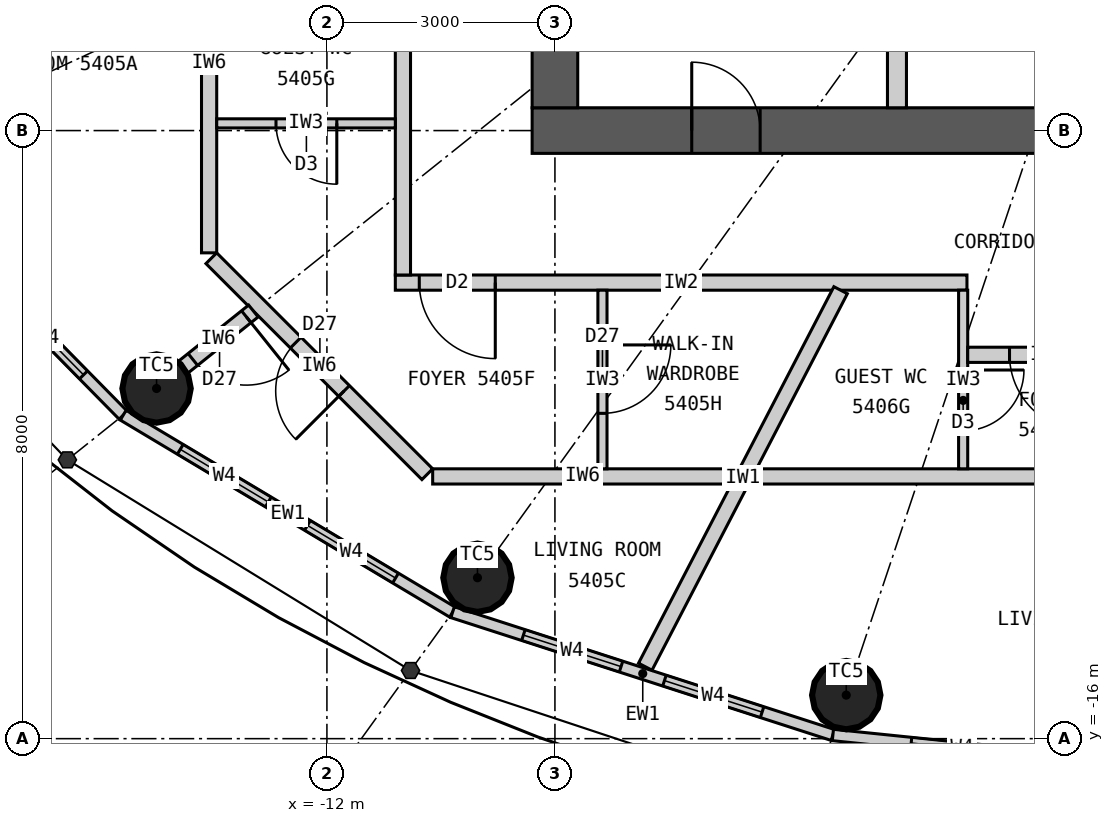
"""IFC4 building model, lengths in metres.
Left out: names, types, materials, properties, quantities, classifications, styles, units other than length and angle.
Written with IfcOpenShell. Run it as: python <this file> out.ifc"""

import sys

from ifc_helpers import new_model, si_unit, direction, frame, frame_2d, origin, origin_2d, place, context, subcontext, project, spatial, rectangle, circle, extrude, element, fill, save


model = new_model("IFC4")
c1 = context("Model", 3, precision=1e-05, world=origin(), true_north=direction((0.0, 1.0)))
c2 = subcontext(c1, "Body", "Model", "MODEL_VIEW")
j1 = project(units=[si_unit("LENGTHUNIT", "METRE"), si_unit("PLANEANGLEUNIT", "RADIAN")], contexts=[c1])
p1 = place(None, origin())
s1 = spatial("IfcSite", under=j1, at=p1, CompositionType="ELEMENT")
p2 = place(p1, origin())
s2 = spatial("IfcBuilding", under=s1, at=p2, CompositionType="ELEMENT")
p3 = place(p2, frame((0.0, 0.0, 202.8)))
s3 = spatial("IfcBuildingStorey", under=s2, at=p3, CompositionType="ELEMENT", Elevation=202.8)
for number, where, z_axis, x_axis in (
    (1, (-14.241, -11.393, 0.0), (0.0, 0.0, 1.0), (1.0, 0.0, 0.0)),
    (2, (-10.019, -13.883, 0.0), (0.0, 0.0, 1.0), (1.0, 0.0, 0.0)),
    (3, (-5.167, -15.427, 0.0), (0.0, 0.0, 1.0), (1.0, 0.0, 0.0)),
):
    element("IfcColumn", number, at=place(p3, frame(where, z_axis=z_axis, x_axis=x_axis)), inside=s3, PredefinedType="COLUMN", context=c2, shape_type="SweptSolid", body=[
        extrude(circle(Radius=0.45, at=origin_2d()), origin(), (0.0, 0.0, 1.0), 3.3),
    ])
p4 = place(p3, frame((9.3, -8.0, 0.0), z_axis=(0.0, 0.0, 1.0), x_axis=(-1.0, 0.0, 0.0)))
e4 = element("IfcWall", 4, at=p4, inside=s3, PredefinedType="SHEAR", context=c2, shape_type="SweptSolid", body=[
    extrude(rectangle(XDim=18.6, YDim=0.6, at=frame_2d((9.3, 0.0))), origin(), (0.0, 0.0, 1.0), 3.3),
])
p5 = place(p4, frame((8.0, 0.0, 0.0)))
e5 = element("IfcOpeningElement", 5, at=p5, cuts=e4, PredefinedType="OPENING", context=c2, shape_type="SweptSolid", body=[
    extrude(rectangle(XDim=1.2, YDim=2.2, at=frame_2d((0.6, 1.1))), frame((0.0, 0.31, 0.0), z_axis=(0.0, -1.0, 0.0), x_axis=(1.0, 0.0, 0.0)), (0.0, 0.0, 1.0), 0.62),
])
p6 = place(p4, frame((15.6, 0.0, 0.0)))
e6 = element("IfcOpeningElement", 6, at=p6, cuts=e4, PredefinedType="OPENING", context=c2, shape_type="SweptSolid", body=[
    extrude(rectangle(XDim=0.9, YDim=2.2, at=frame_2d((0.45, 1.1))), frame((0.0, 0.31, 0.0), z_axis=(0.0, -1.0, 0.0), x_axis=(1.0, 0.0, 0.0)), (0.0, 0.0, 1.0), 0.62),
])
p7 = place(p3, frame((-9.0, 7.7, 0.0), z_axis=(0.0, 0.0, 1.0), x_axis=(0.0, -1.0, 0.0)))
e7 = element("IfcWall", 7, at=p7, inside=s3, PredefinedType="SHEAR", context=c2, shape_type="SweptSolid", body=[
    extrude(rectangle(XDim=15.4, YDim=0.6, at=frame_2d((7.7, 0.0))), origin(), (0.0, 0.0, 1.0), 3.3),
])
p8 = place(p7, frame((6.8, 0.0, 0.0)))
e8 = element("IfcOpeningElement", 8, at=p8, cuts=e7, PredefinedType="OPENING", context=c2, shape_type="SweptSolid", body=[
    extrude(rectangle(XDim=1.8, YDim=2.2, at=frame_2d((0.9, 1.1))), frame((0.0, 0.31, 0.0), z_axis=(0.0, -1.0, 0.0), x_axis=(1.0, 0.0, 0.0)), (0.0, 0.0, 1.0), 0.62),
])
p9 = place(p3, frame((-4.5, -7.7, 0.0), z_axis=(0.0, 0.0, 1.0), x_axis=(0.0, 1.0, 0.0)))
e9 = element("IfcWall", 9, at=p9, inside=s3, PredefinedType="PARTITIONING", context=c2, shape_type="SweptSolid", body=[
    extrude(rectangle(XDim=3.2, YDim=0.25, at=frame_2d((1.6, 0.0))), origin(), (0.0, 0.0, 1.0), 3.3),
])
p10 = place(p3, frame((-18.04, -8.332, 0.0), z_axis=(0.0, 0.0, 1.0), x_axis=(0.701527379618, -0.712642501993, 0.0)))
e10 = element("IfcWall", 10, at=p10, inside=s3, PredefinedType="ELEMENTEDWALL", context=c2, shape_type="SweptSolid", body=[
    extrude(rectangle(XDim=4.788, YDim=0.15, at=frame_2d((2.394, 0.0))), origin(), (0.0, 0.0, 1.0), 3.12),
])
p11 = place(p10, frame((0.744, 0.0, 0.9)))
e11 = element("IfcOpeningElement", 11, at=p11, cuts=e10, PredefinedType="OPENING", context=c2, shape_type="SweptSolid", body=[
    extrude(rectangle(XDim=1.35, YDim=1.9, at=frame_2d((0.675, 0.95))), frame((0.0, 0.085, 0.0), z_axis=(0.0, -1.0, 0.0), x_axis=(1.0, 0.0, 0.0)), (0.0, 0.0, 1.0), 0.17),
])
p12 = place(p10, frame((2.694, 0.0, 0.9)))
e12 = element("IfcOpeningElement", 12, at=p12, cuts=e10, PredefinedType="OPENING", context=c2, shape_type="SweptSolid", body=[
    extrude(rectangle(XDim=1.35, YDim=1.9, at=frame_2d((0.675, 0.95))), frame((0.0, 0.085, 0.0), z_axis=(0.0, -1.0, 0.0), x_axis=(1.0, 0.0, 0.0)), (0.0, 0.0, 1.0), 0.17),
])
p13 = place(p3, frame((-14.68, -11.744, 0.0), z_axis=(0.0, 0.0, 1.0), x_axis=(0.85822150553, -0.513279502265, 0.0)))
e13 = element("IfcWall", 13, at=p13, inside=s3, PredefinedType="ELEMENTEDWALL", context=c2, shape_type="SweptSolid", body=[
    extrude(rectangle(XDim=5.05, YDim=0.15, at=frame_2d((2.525, 0.0))), origin(), (0.0, 0.0, 1.0), 3.12),
])
p14 = place(p13, frame((0.875, 0.0, 0.9)))
e14 = element("IfcOpeningElement", 14, at=p14, cuts=e13, PredefinedType="OPENING", context=c2, shape_type="SweptSolid", body=[
    extrude(rectangle(XDim=1.35, YDim=1.9, at=frame_2d((0.675, 0.95))), frame((0.0, 0.085, 0.0), z_axis=(0.0, -1.0, 0.0), x_axis=(1.0, 0.0, 0.0)), (0.0, 0.0, 1.0), 0.17),
])
p15 = place(p13, frame((2.825, 0.0, 0.9)))
e15 = element("IfcOpeningElement", 15, at=p15, cuts=e13, PredefinedType="OPENING", context=c2, shape_type="SweptSolid", body=[
    extrude(rectangle(XDim=1.35, YDim=1.9, at=frame_2d((0.675, 0.95))), frame((0.0, 0.085, 0.0), z_axis=(0.0, -1.0, 0.0), x_axis=(1.0, 0.0, 0.0)), (0.0, 0.0, 1.0), 0.17),
])
p16 = place(p3, frame((-10.346, -14.336, 0.0), z_axis=(0.0, 0.0, 1.0), x_axis=(0.951644702515, -0.307200846638, 0.0)))
e16 = element("IfcWall", 16, at=p16, inside=s3, PredefinedType="ELEMENTEDWALL", context=c2, shape_type="SweptSolid", body=[
    extrude(rectangle(XDim=5.258, YDim=0.15, at=frame_2d((2.629, 0.0))), origin(), (0.0, 0.0, 1.0), 3.12),
])
p17 = place(p16, frame((0.979, 0.0, 0.9)))
e17 = element("IfcOpeningElement", 17, at=p17, cuts=e16, PredefinedType="OPENING", context=c2, shape_type="SweptSolid", body=[
    extrude(rectangle(XDim=1.35, YDim=1.9, at=frame_2d((0.675, 0.95))), frame((0.0, 0.085, 0.0), z_axis=(0.0, -1.0, 0.0), x_axis=(1.0, 0.0, 0.0)), (0.0, 0.0, 1.0), 0.17),
])
p18 = place(p16, frame((2.929, 0.0, 0.9)))
e18 = element("IfcOpeningElement", 18, at=p18, cuts=e16, PredefinedType="OPENING", context=c2, shape_type="SweptSolid", body=[
    extrude(rectangle(XDim=1.35, YDim=1.9, at=frame_2d((0.675, 0.95))), frame((0.0, 0.085, 0.0), z_axis=(0.0, -1.0, 0.0), x_axis=(1.0, 0.0, 0.0)), (0.0, 0.0, 1.0), 0.17),
])
p19 = place(p3, frame((-5.343, -15.952, 0.0), z_axis=(0.0, 0.0, 1.0), x_axis=(0.994774574972, -0.102095763818, 0.0)))
e19 = element("IfcWall", 19, at=p19, inside=s3, PredefinedType="ELEMENTEDWALL", context=c2, shape_type="SweptSolid", body=[
    extrude(rectangle(XDim=5.371, YDim=0.15, at=frame_2d((2.686, 0.0))), origin(), (0.0, 0.0, 1.0), 3.12),
])
p20 = place(p19, frame((1.035, 0.0, 0.9)))
e20 = element("IfcOpeningElement", 20, at=p20, cuts=e19, PredefinedType="OPENING", context=c2, shape_type="SweptSolid", body=[
    extrude(rectangle(XDim=1.35, YDim=1.9, at=frame_2d((0.675, 0.95))), frame((0.0, 0.085, 0.0), z_axis=(0.0, -1.0, 0.0), x_axis=(1.0, 0.0, 0.0)), (0.0, 0.0, 1.0), 0.17),
])
p21 = place(p19, frame((2.985, 0.0, 0.9)))
e21 = element("IfcOpeningElement", 21, at=p21, cuts=e19, PredefinedType="OPENING", context=c2, shape_type="SweptSolid", body=[
    extrude(rectangle(XDim=1.35, YDim=1.9, at=frame_2d((0.675, 0.95))), frame((0.0, 0.085, 0.0), z_axis=(0.0, -1.0, 0.0), x_axis=(1.0, 0.0, 0.0)), (0.0, 0.0, 1.0), 0.17),
])
p22 = place(p3, frame((-3.579, -10.0, 0.0), z_axis=(0.0, 0.0, 1.0), x_axis=(-1.0, 0.0, 0.0)))
e22 = element("IfcWall", 22, at=p22, inside=s3, PredefinedType="PARTITIONING", context=c2, shape_type="SweptSolid", body=[
    extrude(rectangle(XDim=7.521, YDim=0.2, at=frame_2d((3.761, 0.0))), origin(), (0.0, 0.0, 1.0), 3.12),
])
p23 = place(p22, frame((6.206, 0.0, 0.0)))
e23 = element("IfcOpeningElement", 23, at=p23, cuts=e22, PredefinedType="OPENING", context=c2, shape_type="SweptSolid", body=[
    extrude(rectangle(XDim=1.0, YDim=2.2, at=frame_2d((0.5, 1.1))), frame((0.0, 0.11, 0.0), z_axis=(0.0, -1.0, 0.0), x_axis=(1.0, 0.0, 0.0)), (0.0, 0.0, 1.0), 0.22),
])
p24 = place(p3, frame((-11.0, 0.464, 0.0), z_axis=(0.0, 0.0, 1.0), x_axis=(0.0, -1.0, 0.0)))
e24 = element("IfcWall", 24, at=p24, inside=s3, PredefinedType="PARTITIONING", context=c2, shape_type="SweptSolid", body=[
    extrude(rectangle(XDim=10.364, YDim=0.2, at=frame_2d((5.182, 0.0))), origin(), (0.0, 0.0, 1.0), 3.12),
])
p25 = place(p3, frame((-5.241, -10.1, 0.0), z_axis=(0.0, 0.0, 1.0), x_axis=(-0.460603196597, -0.887606160008, 0.0)))
e25 = element("IfcWall", 25, at=p25, inside=s3, PredefinedType="PARTITIONING", context=c2, shape_type="SweptSolid", body=[
    extrude(rectangle(XDim=5.58, YDim=0.2, at=frame_2d((2.79, 0.0))), origin(), (0.0, 0.0, 1.0), 3.12),
])
p26 = place(p3, frame((-13.55, -4.6, 0.0), z_axis=(0.0, 0.0, 1.0), x_axis=(0.0, -1.0, 0.0)))
e26 = element("IfcWall", 26, at=p26, inside=s3, PredefinedType="PARTITIONING", context=c2, shape_type="SweptSolid", body=[
    extrude(rectangle(XDim=5.009, YDim=0.2, at=frame_2d((2.504, 0.0))), origin(), (0.0, 0.0, 1.0), 3.12),
])
p27 = place(p26, frame((0.774, 0.0, 0.0)))
e27 = element("IfcOpeningElement", 27, at=p27, cuts=e26, PredefinedType="OPENING", context=c2, shape_type="SweptSolid", body=[
    extrude(rectangle(XDim=0.8, YDim=2.1, at=frame_2d((0.4, 1.05))), frame((0.0, 0.11, 0.0), z_axis=(0.0, -1.0, 0.0), x_axis=(1.0, 0.0, 0.0)), (0.0, 0.0, 1.0), 0.22),
])
p28 = place(p3, frame((-13.521, -9.679, 0.0), z_axis=(0.0, 0.0, 1.0), x_axis=(0.707106781187, -0.707106781187, 0.0)))
e28 = element("IfcWall", 28, at=p28, inside=s3, PredefinedType="PARTITIONING", context=c2, shape_type="SweptSolid", body=[
    extrude(rectangle(XDim=4.019, YDim=0.2, at=frame_2d((2.009, 0.0))), origin(), (0.0, 0.0, 1.0), 3.12),
])
p29 = place(p28, frame((1.57, 0.0, 0.0)))
e29 = element("IfcOpeningElement", 29, at=p29, cuts=e28, PredefinedType="OPENING", context=c2, shape_type="SweptSolid", body=[
    extrude(rectangle(XDim=0.9, YDim=2.1, at=frame_2d((0.45, 1.05))), frame((0.0, 0.11, 0.0), z_axis=(0.0, -1.0, 0.0), x_axis=(1.0, 0.0, 0.0)), (0.0, 0.0, 1.0), 0.22),
])
p30 = place(p3, frame((-10.609, -12.55, 0.0), z_axis=(0.0, 0.0, 1.0), x_axis=(1.0, 0.0, 0.0)))
e30 = element("IfcWall", 30, at=p30, inside=s3, PredefinedType="PARTITIONING", context=c2, shape_type="SweptSolid", body=[
    extrude(rectangle(XDim=3.947, YDim=0.2, at=frame_2d((1.974, 0.0))), origin(), (0.0, 0.0, 1.0), 3.12),
])
p31 = place(p3, frame((-12.968, -10.374, 0.0), z_axis=(0.0, 0.0, 1.0), x_axis=(-0.780888968944, -0.624669847345, 0.0)))
e31 = element("IfcWall", 31, at=p31, inside=s3, PredefinedType="PARTITIONING", context=c2, shape_type="SweptSolid", body=[
    extrude(rectangle(XDim=1.181, YDim=0.2, at=frame_2d((0.591, 0.0))), origin(), (0.0, 0.0, 1.0), 2.42),
])
p32 = place(p31, frame((0.12, 0.0, 0.0)))
e32 = element("IfcOpeningElement", 32, at=p32, cuts=e31, PredefinedType="OPENING", context=c2, shape_type="SweptSolid", body=[
    extrude(rectangle(XDim=0.9, YDim=2.1, at=frame_2d((0.45, 1.05))), frame((0.0, 0.11, 0.0), z_axis=(0.0, -1.0, 0.0), x_axis=(1.0, 0.0, 0.0)), (0.0, 0.0, 1.0), 0.22),
])
p33 = place(p3, frame((-11.1, -7.905, 0.0), z_axis=(0.0, 0.0, 1.0), x_axis=(-1.0, 0.0, 0.0)))
e33 = element("IfcWall", 33, at=p33, inside=s3, PredefinedType="PARTITIONING", context=c2, shape_type="SweptSolid", body=[
    extrude(rectangle(XDim=2.35, YDim=0.12, at=frame_2d((1.175, 0.0))), origin(), (0.0, 0.0, 1.0), 3.12),
])
p34 = place(p33, frame((0.77, 0.0, 0.0)))
e34 = element("IfcOpeningElement", 34, at=p34, cuts=e33, PredefinedType="OPENING", context=c2, shape_type="SweptSolid", body=[
    extrude(rectangle(XDim=0.8, YDim=2.1, at=frame_2d((0.4, 1.05))), frame((0.0, 0.07, 0.0), z_axis=(0.0, -1.0, 0.0), x_axis=(1.0, 0.0, 0.0)), (0.0, 0.0, 1.0), 0.14),
])
p35 = place(p3, frame((-8.375, -10.1, 0.0), z_axis=(0.0, 0.0, 1.0), x_axis=(0.0, -1.0, 0.0)))
e35 = element("IfcWall", 35, at=p35, inside=s3, PredefinedType="PARTITIONING", context=c2, shape_type="SweptSolid", body=[
    extrude(rectangle(XDim=2.35, YDim=0.12, at=frame_2d((1.175, 0.0))), origin(), (0.0, 0.0, 1.0), 3.12),
])
p36 = place(p35, frame((0.72, 0.0, 0.0)))
e36 = element("IfcOpeningElement", 36, at=p36, cuts=e35, PredefinedType="OPENING", context=c2, shape_type="SweptSolid", body=[
    extrude(rectangle(XDim=0.9, YDim=2.1, at=frame_2d((0.45, 1.05))), frame((0.0, 0.07, 0.0), z_axis=(0.0, -1.0, 0.0), x_axis=(1.0, 0.0, 0.0)), (0.0, 0.0, 1.0), 0.14),
])
p37 = place(p3, frame((-6.364, -12.55, 0.0), z_axis=(0.0, 0.0, 1.0), x_axis=(1.0, 0.0, 0.0)))
e37 = element("IfcWall", 37, at=p37, inside=s3, PredefinedType="PARTITIONING", context=c2, shape_type="SweptSolid", body=[
    extrude(rectangle(XDim=10.446, YDim=0.2, at=frame_2d((5.223, 0.0))), origin(), (0.0, 0.0, 1.0), 3.12),
])
p38 = place(p37, frame((7.202, 0.0, 0.0)))
e38 = element("IfcOpeningElement", 38, at=p38, cuts=e37, PredefinedType="OPENING", context=c2, shape_type="SweptSolid", body=[
    extrude(rectangle(XDim=0.8, YDim=2.1, at=frame_2d((0.4, 1.05))), frame((0.0, 0.11, 0.0), z_axis=(0.0, -1.0, 0.0), x_axis=(1.0, 0.0, 0.0)), (0.0, 0.0, 1.0), 0.22),
])
p39 = place(p37, frame((3.895, 0.0, 0.0)))
e39 = element("IfcOpeningElement", 39, at=p39, cuts=e37, PredefinedType="OPENING", context=c2, shape_type="SweptSolid", body=[
    extrude(rectangle(XDim=0.9, YDim=2.1, at=frame_2d((0.45, 1.05))), frame((0.0, 0.11, 0.0), z_axis=(0.0, -1.0, 0.0), x_axis=(1.0, 0.0, 0.0)), (0.0, 0.0, 1.0), 0.22),
])
p40 = place(p3, frame((-3.629, -10.1, 0.0), z_axis=(0.0, 0.0, 1.0), x_axis=(0.0, -1.0, 0.0)))
e40 = element("IfcWall", 40, at=p40, inside=s3, PredefinedType="PARTITIONING", context=c2, shape_type="SweptSolid", body=[
    extrude(rectangle(XDim=2.35, YDim=0.12, at=frame_2d((1.175, 0.0))), origin(), (0.0, 0.0, 1.0), 3.12),
])
p41 = place(p40, frame((1.05, 0.0, 0.0)))
e41 = element("IfcOpeningElement", 41, at=p41, cuts=e40, PredefinedType="OPENING", context=c2, shape_type="SweptSolid", body=[
    extrude(rectangle(XDim=0.8, YDim=2.1, at=frame_2d((0.4, 1.05))), frame((0.0, 0.07, 0.0), z_axis=(0.0, -1.0, 0.0), x_axis=(1.0, 0.0, 0.0)), (0.0, 0.0, 1.0), 0.14),
])
p42 = place(p3, frame((-3.569, -10.95, 0.0), z_axis=(0.0, 0.0, 1.0), x_axis=(1.0, 0.0, 0.0)))
e42 = element("IfcWall", 42, at=p42, inside=s3, PredefinedType="PARTITIONING", context=c2, shape_type="SweptSolid", body=[
    extrude(rectangle(XDim=2.1, YDim=0.2, at=frame_2d((1.05, 0.0))), origin(), (0.0, 0.0, 1.0), 3.12),
])
p43 = place(p42, frame((0.55, 0.0, 0.0)))
e43 = element("IfcOpeningElement", 43, at=p43, cuts=e42, PredefinedType="OPENING", context=c2, shape_type="SweptSolid", body=[
    extrude(rectangle(XDim=1.0, YDim=2.2, at=frame_2d((0.5, 1.1))), frame((0.0, 0.11, 0.0), z_axis=(0.0, -1.0, 0.0), x_axis=(1.0, 0.0, 0.0)), (0.0, 0.0, 1.0), 0.22),
])
p44 = place(p12, origin())
e44 = element("IfcWindow", 44, at=p44, inside=s3, PartitioningType="SINGLE_PANEL", PredefinedType="WINDOW", context=c2, shape_type="SweptSolid", body=[
    extrude(rectangle(XDim=1.35, YDim=1.9, at=frame_2d((0.675, 0.95))), frame((0.0, 0.03, 0.0), z_axis=(0.0, -1.0, 0.0), x_axis=(1.0, 0.0, 0.0)), (0.0, 0.0, 1.0), 0.06),
])
fill(e12, e44)
p45 = place(p14, origin())
e45 = element("IfcWindow", 45, at=p45, inside=s3, PartitioningType="SINGLE_PANEL", PredefinedType="WINDOW", context=c2, shape_type="SweptSolid", body=[
    extrude(rectangle(XDim=1.35, YDim=1.9, at=frame_2d((0.675, 0.95))), frame((0.0, 0.03, 0.0), z_axis=(0.0, -1.0, 0.0), x_axis=(1.0, 0.0, 0.0)), (0.0, 0.0, 1.0), 0.06),
])
fill(e14, e45)
p46 = place(p15, origin())
e46 = element("IfcWindow", 46, at=p46, inside=s3, PartitioningType="SINGLE_PANEL", PredefinedType="WINDOW", context=c2, shape_type="SweptSolid", body=[
    extrude(rectangle(XDim=1.35, YDim=1.9, at=frame_2d((0.675, 0.95))), frame((0.0, 0.03, 0.0), z_axis=(0.0, -1.0, 0.0), x_axis=(1.0, 0.0, 0.0)), (0.0, 0.0, 1.0), 0.06),
])
fill(e15, e46)
p47 = place(p17, origin())
e47 = element("IfcWindow", 47, at=p47, inside=s3, PartitioningType="SINGLE_PANEL", PredefinedType="WINDOW", context=c2, shape_type="SweptSolid", body=[
    extrude(rectangle(XDim=1.35, YDim=1.9, at=frame_2d((0.675, 0.95))), frame((0.0, 0.03, 0.0), z_axis=(0.0, -1.0, 0.0), x_axis=(1.0, 0.0, 0.0)), (0.0, 0.0, 1.0), 0.06),
])
fill(e17, e47)
p48 = place(p18, origin())
e48 = element("IfcWindow", 48, at=p48, inside=s3, PartitioningType="SINGLE_PANEL", PredefinedType="WINDOW", context=c2, shape_type="SweptSolid", body=[
    extrude(rectangle(XDim=1.35, YDim=1.9, at=frame_2d((0.675, 0.95))), frame((0.0, 0.03, 0.0), z_axis=(0.0, -1.0, 0.0), x_axis=(1.0, 0.0, 0.0)), (0.0, 0.0, 1.0), 0.06),
])
fill(e18, e48)
p49 = place(p20, origin())
e49 = element("IfcWindow", 49, at=p49, inside=s3, PartitioningType="SINGLE_PANEL", PredefinedType="WINDOW", context=c2, shape_type="SweptSolid", body=[
    extrude(rectangle(XDim=1.35, YDim=1.9, at=frame_2d((0.675, 0.95))), frame((0.0, 0.03, 0.0), z_axis=(0.0, -1.0, 0.0), x_axis=(1.0, 0.0, 0.0)), (0.0, 0.0, 1.0), 0.06),
])
fill(e20, e49)
p50 = place(p23, origin())
e50 = element("IfcDoor", 50, at=p50, inside=s3, OperationType="SINGLE_SWING_LEFT", PredefinedType="DOOR", context=c2, shape_type="SweptSolid", body=[
    extrude(rectangle(XDim=1.0, YDim=2.2, at=frame_2d((0.5, 1.1))), frame((0.0, 0.025, 0.0), z_axis=(0.0, -1.0, 0.0), x_axis=(1.0, 0.0, 0.0)), (0.0, 0.0, 1.0), 0.05),
])
fill(e23, e50)
p51 = place(p34, origin())
e51 = element("IfcDoor", 51, at=p51, inside=s3, OperationType="SINGLE_SWING_LEFT", PredefinedType="DOOR", context=c2, shape_type="SweptSolid", body=[
    extrude(rectangle(XDim=0.8, YDim=2.1, at=frame_2d((0.4, 1.05))), frame((0.0, 0.025, 0.0), z_axis=(0.0, -1.0, 0.0), x_axis=(1.0, 0.0, 0.0)), (0.0, 0.0, 1.0), 0.05),
])
fill(e34, e51)
p52 = place(p36, origin())
e52 = element("IfcDoor", 52, at=p52, inside=s3, OperationType="SINGLE_SWING_LEFT", PredefinedType="DOOR", context=c2, shape_type="SweptSolid", body=[
    extrude(rectangle(XDim=0.9, YDim=2.1, at=frame_2d((0.45, 1.05))), frame((0.0, 0.025, 0.0), z_axis=(0.0, -1.0, 0.0), x_axis=(1.0, 0.0, 0.0)), (0.0, 0.0, 1.0), 0.05),
])
fill(e36, e52)
p53 = place(p29, origin())
e53 = element("IfcDoor", 53, at=p53, inside=s3, OperationType="SINGLE_SWING_RIGHT", PredefinedType="DOOR", context=c2, shape_type="SweptSolid", body=[
    extrude(rectangle(XDim=0.9, YDim=2.1, at=frame_2d((0.45, 1.05))), frame((0.0, 0.025, 0.0), z_axis=(0.0, -1.0, 0.0), x_axis=(1.0, 0.0, 0.0)), (0.0, 0.0, 1.0), 0.05),
])
fill(e29, e53)
p54 = place(p32, origin())
e54 = element("IfcDoor", 54, at=p54, inside=s3, OperationType="SINGLE_SWING_LEFT", PredefinedType="DOOR", context=c2, shape_type="SweptSolid", body=[
    extrude(rectangle(XDim=0.9, YDim=2.1, at=frame_2d((0.45, 1.05))), frame((0.0, 0.025, 0.0), z_axis=(0.0, -1.0, 0.0), x_axis=(1.0, 0.0, 0.0)), (0.0, 0.0, 1.0), 0.05),
])
fill(e32, e54)
p55 = place(p43, origin())
e55 = element("IfcDoor", 55, at=p55, inside=s3, OperationType="SINGLE_SWING_RIGHT", PredefinedType="DOOR", context=c2, shape_type="SweptSolid", body=[
    extrude(rectangle(XDim=1.0, YDim=2.2, at=frame_2d((0.5, 1.1))), frame((0.0, 0.025, 0.0), z_axis=(0.0, -1.0, 0.0), x_axis=(1.0, 0.0, 0.0)), (0.0, 0.0, 1.0), 0.05),
])
fill(e43, e55)
p56 = place(p41, origin())
e56 = element("IfcDoor", 56, at=p56, inside=s3, OperationType="SINGLE_SWING_LEFT", PredefinedType="DOOR", context=c2, shape_type="SweptSolid", body=[
    extrude(rectangle(XDim=0.8, YDim=2.1, at=frame_2d((0.4, 1.05))), frame((0.0, 0.025, 0.0), z_axis=(0.0, -1.0, 0.0), x_axis=(1.0, 0.0, 0.0)), (0.0, 0.0, 1.0), 0.05),
])
fill(e41, e56)
p57 = place(p6, origin())
e57 = element("IfcDoor", 57, at=p57, inside=s3, OperationType="SINGLE_SWING_RIGHT", PredefinedType="DOOR", context=c2, shape_type="SweptSolid", body=[
    extrude(rectangle(XDim=0.9, YDim=2.2, at=frame_2d((0.45, 1.1))), frame((0.0, 0.025, 0.0), z_axis=(0.0, -1.0, 0.0), x_axis=(1.0, 0.0, 0.0)), (0.0, 0.0, 1.0), 0.05),
])
fill(e6, e57)
save(model, sys.argv[1])
